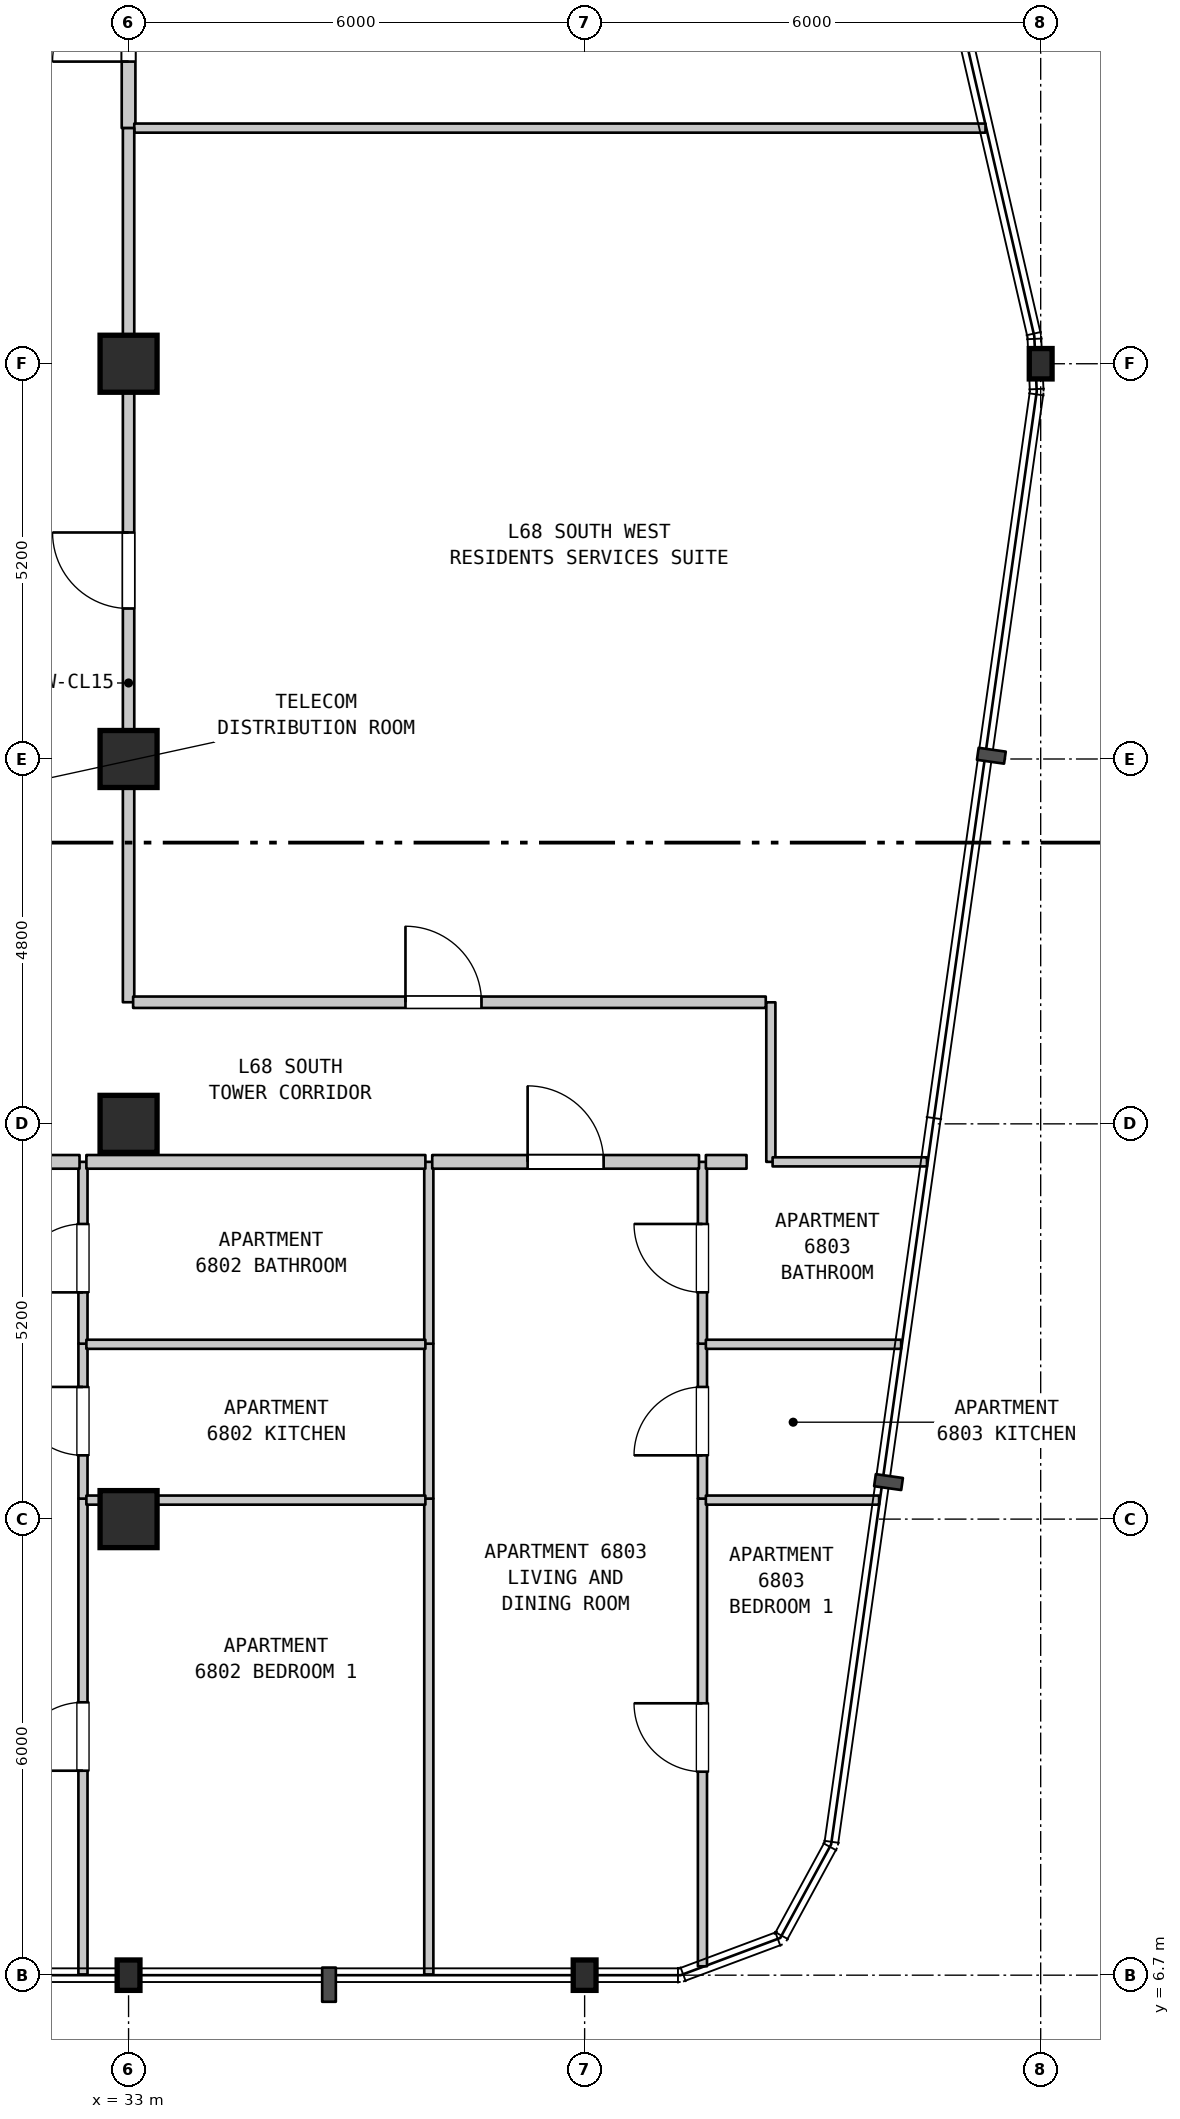
"""IFC4 building model, lengths in metres.
Left out: names, types, materials, properties, quantities, classifications, styles, units other than length and angle.
Written with IfcOpenShell. Run it as: python <this file> out.ifc"""

import sys

from ifc_helpers import new_model, si_unit, direction, frame, frame_2d, origin, origin_2d, place, context, subcontext, project, spatial, rectangle, i_section, extrude, element, fill, save


model = new_model("IFC4")
c1 = context("Model", 3, precision=1e-05, world=origin(), true_north=direction((0.0, 1.0)))
c2 = subcontext(c1, "Body", "Model", "MODEL_VIEW")
j1 = project(units=[si_unit("LENGTHUNIT", "METRE"), si_unit("PLANEANGLEUNIT", "RADIAN")], contexts=[c1])
p1 = place(None, origin())
s1 = spatial("IfcSite", under=j1, at=p1, CompositionType="ELEMENT")
p2 = place(p1, origin())
s2 = spatial("IfcBuilding", under=s1, at=p2, CompositionType="ELEMENT")
p3 = place(p2, frame((0.0, 0.0, 273.2)))
s3 = spatial("IfcBuildingStorey", under=s2, at=p3, CompositionType="ELEMENT", Elevation=273.2)
p4 = place(p3, frame((33.0, 6.7, 0.0), z_axis=(0.0, 0.0, 1.0), x_axis=(1.0, 0.0, 0.0)))
e1 = element("IfcColumn", 1, at=p4, inside=s3, PredefinedType="COLUMN", context=c2, shape_type="SweptSolid", body=[
    extrude(i_section(OverallWidth=0.3, OverallDepth=0.4, WebThickness=0.013, FlangeThickness=0.024, FilletRadius=0.027, at=origin_2d()), origin(), (0.0, 0.0, 1.0), 3.7),
])
for number, where, z_axis, x_axis in (
    (2, (33.0, 12.7, 0.0), (0.0, 0.0, 1.0), (1.0, 0.0, 0.0)),
    (3, (33.0, 17.9, 0.0), (0.0, 0.0, 1.0), (1.0, 0.0, 0.0)),
    (4, (33.0, 22.7, 0.0), (0.0, 0.0, 1.0), (1.0, 0.0, 0.0)),
    (5, (33.0, 27.9, 0.0), (0.0, 0.0, 1.0), (1.0, 0.0, 0.0)),
):
    element("IfcColumn", number, at=place(p3, frame(where, z_axis=z_axis, x_axis=x_axis)), inside=s3, PredefinedType="COLUMN", context=c2, shape_type="SweptSolid", body=[
        extrude(rectangle(XDim=0.75, YDim=0.75, at=origin_2d()), origin(), (0.0, 0.0, 1.0), 3.7),
    ])
for number, where, z_axis, x_axis in (
    (6, (39.0, 6.7, 0.0), (0.0, 0.0, 1.0), (1.0, 0.0, 0.0)),
    (7, (45.0, 27.9, 0.0), (0.0, 0.0, 1.0), (1.0, 0.0, 0.0)),
):
    element("IfcColumn", number, at=place(p3, frame(where, z_axis=z_axis, x_axis=x_axis)), inside=s3, PredefinedType="COLUMN", context=c2, shape_type="SweptSolid", body=[
        extrude(i_section(OverallWidth=0.3, OverallDepth=0.4, WebThickness=0.013, FlangeThickness=0.024, FilletRadius=0.027, at=origin_2d()), origin(), (0.0, 0.0, 1.0), 3.7),
    ])
p5 = place(p3, frame((32.4, 6.71, 0.0), z_axis=(0.0, 0.0, 1.0), x_axis=(0.0, 1.0, 0.0)))
e8 = element("IfcWall", 8, at=p5, inside=s3, PredefinedType="PARTITIONING", context=c2, shape_type="SweptSolid", body=[
    extrude(rectangle(XDim=6.26, YDim=0.12, at=frame_2d((3.13, 0.0))), origin(), (0.0, 0.0, 1.0), 3.39),
])
p6 = place(p5, frame((2.68, 0.0, 0.0)))
e9 = element("IfcOpeningElement", 9, at=p6, cuts=e8, PredefinedType="OPENING", context=c2, shape_type="SweptSolid", body=[
    extrude(rectangle(XDim=0.9, YDim=2.15, at=frame_2d((0.45, 1.075))), frame((0.0, 0.07, 0.0), z_axis=(0.0, -1.0, 0.0), x_axis=(1.0, 0.0, 0.0)), (0.0, 0.0, 1.0), 0.14),
])
p7 = place(p3, frame((32.4, 12.97, 0.0), z_axis=(0.0, 0.0, 1.0), x_axis=(0.0, 1.0, 0.0)))
e10 = element("IfcWall", 10, at=p7, inside=s3, PredefinedType="PARTITIONING", context=c2, shape_type="SweptSolid", body=[
    extrude(rectangle(XDim=2.038, YDim=0.12, at=frame_2d((1.019, 0.0))), origin(), (0.0, 0.0, 1.0), 3.39),
])
p8 = place(p7, frame((0.569, 0.0, 0.0)))
e11 = element("IfcOpeningElement", 11, at=p8, cuts=e10, PredefinedType="OPENING", context=c2, shape_type="SweptSolid", body=[
    extrude(rectangle(XDim=0.9, YDim=2.15, at=frame_2d((0.45, 1.075))), frame((0.0, 0.07, 0.0), z_axis=(0.0, -1.0, 0.0), x_axis=(1.0, 0.0, 0.0)), (0.0, 0.0, 1.0), 0.14),
])
p9 = place(p3, frame((32.4, 15.008, 0.0), z_axis=(0.0, 0.0, 1.0), x_axis=(0.0, 1.0, 0.0)))
e12 = element("IfcWall", 12, at=p9, inside=s3, PredefinedType="PARTITIONING", context=c2, shape_type="SweptSolid", body=[
    extrude(rectangle(XDim=2.392, YDim=0.12, at=frame_2d((1.196, 0.0))), origin(), (0.0, 0.0, 1.0), 3.39),
])
p10 = place(p9, frame((0.675, 0.0, 0.0)))
e13 = element("IfcOpeningElement", 13, at=p10, cuts=e12, PredefinedType="OPENING", context=c2, shape_type="SweptSolid", body=[
    extrude(rectangle(XDim=0.9, YDim=2.1, at=frame_2d((0.45, 1.05))), frame((0.0, 0.07, 0.0), z_axis=(0.0, -1.0, 0.0), x_axis=(1.0, 0.0, 0.0)), (0.0, 0.0, 1.0), 0.14),
])
p11 = place(p3, frame((33.0, 19.5, 0.0), z_axis=(0.0, 0.0, 1.0), x_axis=(0.0, 1.0, 0.0)))
e14 = element("IfcWall", 14, at=p11, inside=s3, PredefinedType="STANDARD", context=c2, shape_type="SweptSolid", body=[
    extrude(rectangle(XDim=8.4, YDim=0.15, at=frame_2d((4.2, 0.0))), origin(), (0.0, 0.0, 1.0), 3.1),
])
p12 = place(p11, frame((5.18, 0.0, 0.0)))
e15 = element("IfcOpeningElement", 15, at=p12, cuts=e14, PredefinedType="OPENING", context=c2, shape_type="SweptSolid", body=[
    extrude(rectangle(XDim=1.0, YDim=2.15, at=frame_2d((0.5, 1.075))), frame((0.0, 0.085, 0.0), z_axis=(0.0, -1.0, 0.0), x_axis=(1.0, 0.0, 0.0)), (0.0, 0.0, 1.0), 0.17),
])
p13 = place(p3, frame((33.0, 31.0, 0.0), z_axis=(0.0, 0.0, 1.0), x_axis=(0.0, 1.0, 0.0)))
e16 = element("IfcWall", 16, at=p13, inside=s3, PredefinedType="STANDARD", context=c2, shape_type="SweptSolid", body=[
    extrude(rectangle(XDim=2.75, YDim=0.18, at=frame_2d((1.375, 0.0))), origin(), (0.0, 0.0, 1.0), 2.89),
])
p14 = place(p13, frame((0.875, 0.0, 0.0)))
e17 = element("IfcOpeningElement", 17, at=p14, cuts=e16, PredefinedType="OPENING", context=c2, shape_type="SweptSolid", body=[
    extrude(rectangle(XDim=1.0, YDim=2.15, at=frame_2d((0.5, 1.075))), frame((0.0, 0.1, 0.0), z_axis=(0.0, -1.0, 0.0), x_axis=(1.0, 0.0, 0.0)), (0.0, 0.0, 1.0), 0.2),
])
p15 = place(p3, frame((36.95, 6.71, 0.0), z_axis=(0.0, 0.0, 1.0), x_axis=(0.0, 1.0, 0.0)))
e18 = element("IfcWall", 18, at=p15, inside=s3, PredefinedType="PARTITIONING", context=c2, shape_type="SweptSolid", body=[
    extrude(rectangle(XDim=6.26, YDim=0.12, at=frame_2d((3.13, 0.0))), origin(), (0.0, 0.0, 1.0), 3.39),
])
p16 = place(p3, frame((36.95, 12.97, 0.0), z_axis=(0.0, 0.0, 1.0), x_axis=(0.0, 1.0, 0.0)))
e19 = element("IfcWall", 19, at=p16, inside=s3, PredefinedType="PARTITIONING", context=c2, shape_type="SweptSolid", body=[
    extrude(rectangle(XDim=2.038, YDim=0.12, at=frame_2d((1.019, 0.0))), origin(), (0.0, 0.0, 1.0), 3.39),
])
p17 = place(p3, frame((36.95, 15.008, 0.0), z_axis=(0.0, 0.0, 1.0), x_axis=(0.0, 1.0, 0.0)))
e20 = element("IfcWall", 20, at=p17, inside=s3, PredefinedType="PARTITIONING", context=c2, shape_type="SweptSolid", body=[
    extrude(rectangle(XDim=2.392, YDim=0.12, at=frame_2d((1.196, 0.0))), origin(), (0.0, 0.0, 1.0), 3.39),
])
p18 = place(p3, frame((40.55, 6.817, 0.0), z_axis=(0.0, 0.0, 1.0), x_axis=(0.0, 1.0, 0.0)))
e21 = element("IfcWall", 21, at=p18, inside=s3, PredefinedType="PARTITIONING", context=c2, shape_type="SweptSolid", body=[
    extrude(rectangle(XDim=6.153, YDim=0.12, at=frame_2d((3.077, 0.0))), origin(), (0.0, 0.0, 1.0), 3.39),
])
p19 = place(p18, frame((2.56, 0.0, 0.0)))
e22 = element("IfcOpeningElement", 22, at=p19, cuts=e21, PredefinedType="OPENING", context=c2, shape_type="SweptSolid", body=[
    extrude(rectangle(XDim=0.9, YDim=2.15, at=frame_2d((0.45, 1.075))), frame((0.0, 0.07, 0.0), z_axis=(0.0, -1.0, 0.0), x_axis=(1.0, 0.0, 0.0)), (0.0, 0.0, 1.0), 0.14),
])
p20 = place(p3, frame((40.55, 12.97, 0.0), z_axis=(0.0, 0.0, 1.0), x_axis=(0.0, 1.0, 0.0)))
e23 = element("IfcWall", 23, at=p20, inside=s3, PredefinedType="PARTITIONING", context=c2, shape_type="SweptSolid", body=[
    extrude(rectangle(XDim=2.038, YDim=0.12, at=frame_2d((1.019, 0.0))), origin(), (0.0, 0.0, 1.0), 3.39),
])
p21 = place(p20, frame((0.569, 0.0, 0.0)))
e24 = element("IfcOpeningElement", 24, at=p21, cuts=e23, PredefinedType="OPENING", context=c2, shape_type="SweptSolid", body=[
    extrude(rectangle(XDim=0.9, YDim=2.15, at=frame_2d((0.45, 1.075))), frame((0.0, 0.07, 0.0), z_axis=(0.0, -1.0, 0.0), x_axis=(1.0, 0.0, 0.0)), (0.0, 0.0, 1.0), 0.14),
])
p22 = place(p3, frame((40.55, 15.008, 0.0), z_axis=(0.0, 0.0, 1.0), x_axis=(0.0, 1.0, 0.0)))
e25 = element("IfcWall", 25, at=p22, inside=s3, PredefinedType="PARTITIONING", context=c2, shape_type="SweptSolid", body=[
    extrude(rectangle(XDim=2.392, YDim=0.12, at=frame_2d((1.196, 0.0))), origin(), (0.0, 0.0, 1.0), 3.39),
])
p23 = place(p22, frame((0.675, 0.0, 0.0)))
e26 = element("IfcOpeningElement", 26, at=p23, cuts=e25, PredefinedType="OPENING", context=c2, shape_type="SweptSolid", body=[
    extrude(rectangle(XDim=0.9, YDim=2.1, at=frame_2d((0.45, 1.05))), frame((0.0, 0.07, 0.0), z_axis=(0.0, -1.0, 0.0), x_axis=(1.0, 0.0, 0.0)), (0.0, 0.0, 1.0), 0.14),
])
p24 = place(p3, frame((41.45, 17.4, 0.0), z_axis=(0.0, 0.0, 1.0), x_axis=(0.0, 1.0, 0.0)))
e27 = element("IfcWall", 27, at=p24, inside=s3, PredefinedType="PARTITIONING", context=c2, shape_type="SweptSolid", body=[
    extrude(rectangle(XDim=2.099, YDim=0.12, at=frame_2d((1.05, 0.0))), origin(), (0.0, 0.0, 1.0), 3.39),
])
p25 = place(p3, frame((32.445, 12.95, 0.0), z_axis=(0.0, 0.0, 1.0), x_axis=(1.0, 0.0, 0.0)))
e28 = element("IfcWall", 28, at=p25, inside=s3, PredefinedType="PARTITIONING", context=c2, shape_type="SweptSolid", body=[
    extrude(rectangle(XDim=4.46, YDim=0.12, at=frame_2d((2.23, 0.0))), origin(), (0.0, 0.0, 1.0), 3.39),
])
p26 = place(p3, frame((40.595, 12.95, 0.0), z_axis=(0.0, 0.0, 1.0), x_axis=(1.0, 0.0, 0.0)))
e29 = element("IfcWall", 29, at=p26, inside=s3, PredefinedType="PARTITIONING", context=c2, shape_type="SweptSolid", body=[
    extrude(rectangle(XDim=2.279, YDim=0.12, at=frame_2d((1.14, 0.0))), origin(), (0.0, 0.0, 1.0), 3.39),
])
p27 = place(p3, frame((32.445, 15.0, 0.0), z_axis=(0.0, 0.0, 1.0), x_axis=(1.0, 0.0, 0.0)))
e30 = element("IfcWall", 30, at=p27, inside=s3, PredefinedType="PARTITIONING", context=c2, shape_type="SweptSolid", body=[
    extrude(rectangle(XDim=4.46, YDim=0.12, at=frame_2d((2.23, 0.0))), origin(), (0.0, 0.0, 1.0), 3.39),
])
p28 = place(p3, frame((40.595, 15.0, 0.0), z_axis=(0.0, 0.0, 1.0), x_axis=(1.0, 0.0, 0.0)))
e31 = element("IfcWall", 31, at=p28, inside=s3, PredefinedType="PARTITIONING", context=c2, shape_type="SweptSolid", body=[
    extrude(rectangle(XDim=2.569, YDim=0.12, at=frame_2d((1.285, 0.0))), origin(), (0.0, 0.0, 1.0), 3.39),
])
p29 = place(p3, frame((28.845, 17.4, 0.0), z_axis=(0.0, 0.0, 1.0), x_axis=(1.0, 0.0, 0.0)))
e32 = element("IfcWall", 32, at=p29, inside=s3, PredefinedType="STANDARD", context=c2, shape_type="SweptSolid", body=[
    extrude(rectangle(XDim=3.51, YDim=0.18, at=frame_2d((1.755, 0.0))), origin(), (0.0, 0.0, 1.0), 3.39),
])
p30 = place(p29, frame((1.255, 0.0, 0.0)))
e33 = element("IfcOpeningElement", 33, at=p30, cuts=e32, PredefinedType="OPENING", context=c2, shape_type="SweptSolid", body=[
    extrude(rectangle(XDim=1.0, YDim=2.15, at=frame_2d((0.5, 1.075))), frame((0.0, 0.1, 0.0), z_axis=(0.0, -1.0, 0.0), x_axis=(1.0, 0.0, 0.0)), (0.0, 0.0, 1.0), 0.2),
])
p31 = place(p3, frame((32.445, 17.4, 0.0), z_axis=(0.0, 0.0, 1.0), x_axis=(1.0, 0.0, 0.0)))
e34 = element("IfcWall", 34, at=p31, inside=s3, PredefinedType="STANDARD", context=c2, shape_type="SweptSolid", body=[
    extrude(rectangle(XDim=4.46, YDim=0.18, at=frame_2d((2.23, 0.0))), origin(), (0.0, 0.0, 1.0), 3.39),
])
p32 = place(p3, frame((36.995, 17.4, 0.0), z_axis=(0.0, 0.0, 1.0), x_axis=(1.0, 0.0, 0.0)))
e35 = element("IfcWall", 35, at=p32, inside=s3, PredefinedType="STANDARD", context=c2, shape_type="SweptSolid", body=[
    extrude(rectangle(XDim=3.51, YDim=0.18, at=frame_2d((1.755, 0.0))), origin(), (0.0, 0.0, 1.0), 3.39),
])
p33 = place(p32, frame((1.255, 0.0, 0.0)))
e36 = element("IfcOpeningElement", 36, at=p33, cuts=e35, PredefinedType="OPENING", context=c2, shape_type="SweptSolid", body=[
    extrude(rectangle(XDim=1.0, YDim=2.15, at=frame_2d((0.5, 1.075))), frame((0.0, 0.1, 0.0), z_axis=(0.0, -1.0, 0.0), x_axis=(1.0, 0.0, 0.0)), (0.0, 0.0, 1.0), 0.2),
])
p34 = place(p3, frame((40.595, 17.4, 0.0), z_axis=(0.0, 0.0, 1.0), x_axis=(1.0, 0.0, 0.0)))
e37 = element("IfcWall", 37, at=p34, inside=s3, PredefinedType="STANDARD", context=c2, shape_type="SweptSolid", body=[
    extrude(rectangle(XDim=0.535, YDim=0.18, at=frame_2d((0.268, 0.0))), origin(), (0.0, 0.0, 1.0), 3.39),
])
p35 = place(p3, frame((41.473, 17.4, 0.0), z_axis=(0.0, 0.0, 1.0), x_axis=(1.0, 0.0, 0.0)))
e38 = element("IfcWall", 38, at=p35, inside=s3, PredefinedType="PARTITIONING", context=c2, shape_type="SweptSolid", body=[
    extrude(rectangle(XDim=2.031, YDim=0.12, at=frame_2d((1.016, 0.0))), origin(), (0.0, 0.0, 1.0), 3.39),
])
p36 = place(p3, frame((33.06, 19.5, 0.0), z_axis=(0.0, 0.0, 1.0), x_axis=(1.0, 0.0, 0.0)))
e39 = element("IfcWall", 39, at=p36, inside=s3, PredefinedType="STANDARD", context=c2, shape_type="SweptSolid", body=[
    extrude(rectangle(XDim=8.323, YDim=0.15, at=frame_2d((4.162, 0.0))), origin(), (0.0, 0.0, 1.0), 3.39),
])
p37 = place(p36, frame((3.583, 0.0, 0.0)))
e40 = element("IfcOpeningElement", 40, at=p37, cuts=e39, PredefinedType="OPENING", context=c2, shape_type="SweptSolid", body=[
    extrude(rectangle(XDim=1.0, YDim=2.15, at=frame_2d((0.5, 1.075))), frame((0.0, 0.085, 0.0), z_axis=(0.0, -1.0, 0.0), x_axis=(1.0, 0.0, 0.0)), (0.0, 0.0, 1.0), 0.17),
])
p38 = place(p3, frame((33.075, 31.0, 0.0), z_axis=(0.0, 0.0, 1.0), x_axis=(1.0, 0.0, 0.0)))
e41 = element("IfcWall", 41, at=p38, inside=s3, PredefinedType="PARTITIONING", context=c2, shape_type="SweptSolid", body=[
    extrude(rectangle(XDim=11.199, YDim=0.12, at=frame_2d((5.6, 0.0))), origin(), (0.0, 0.0, 1.0), 3.39),
])
p39 = place(p3, frame((33.0, 27.9, 0.0), z_axis=(0.0, 0.0, 1.0), x_axis=(0.0, 1.0, 0.0)))
e42 = element("IfcWall", 42, at=p39, inside=s3, PredefinedType="STANDARD", context=c2, shape_type="SweptSolid", body=[
    extrude(rectangle(XDim=3.1, YDim=0.15, at=frame_2d((1.55, 0.0))), origin(), (0.0, 0.0, 1.0), 2.89),
])
p40 = place(p6, origin())
e43 = element("IfcDoor", 43, at=p40, inside=s3, OperationType="SINGLE_SWING_LEFT", PredefinedType="DOOR", context=c2, shape_type="SweptSolid", body=[
    extrude(rectangle(XDim=0.9, YDim=2.15, at=frame_2d((0.45, 1.075))), frame((0.0, 0.025, 0.0), z_axis=(0.0, -1.0, 0.0), x_axis=(1.0, 0.0, 0.0)), (0.0, 0.0, 1.0), 0.05),
])
fill(e9, e43)
p41 = place(p8, origin())
e44 = element("IfcDoor", 44, at=p41, inside=s3, OperationType="SINGLE_SWING_RIGHT", PredefinedType="DOOR", context=c2, shape_type="SweptSolid", body=[
    extrude(rectangle(XDim=0.9, YDim=2.15, at=frame_2d((0.45, 1.075))), frame((0.0, 0.025, 0.0), z_axis=(0.0, -1.0, 0.0), x_axis=(1.0, 0.0, 0.0)), (0.0, 0.0, 1.0), 0.05),
])
fill(e11, e44)
p42 = place(p10, origin())
e45 = element("IfcDoor", 45, at=p42, inside=s3, OperationType="SINGLE_SWING_LEFT", PredefinedType="DOOR", context=c2, shape_type="SweptSolid", body=[
    extrude(rectangle(XDim=0.9, YDim=2.1, at=frame_2d((0.45, 1.05))), frame((0.0, 0.025, 0.0), z_axis=(0.0, -1.0, 0.0), x_axis=(1.0, 0.0, 0.0)), (0.0, 0.0, 1.0), 0.05),
])
fill(e13, e45)
p43 = place(p12, origin())
e46 = element("IfcDoor", 46, at=p43, inside=s3, OperationType="SINGLE_SWING_RIGHT", PredefinedType="DOOR", context=c2, shape_type="SweptSolid", body=[
    extrude(rectangle(XDim=1.0, YDim=2.15, at=frame_2d((0.5, 1.075))), frame((0.0, 0.025, 0.0), z_axis=(0.0, -1.0, 0.0), x_axis=(1.0, 0.0, 0.0)), (0.0, 0.0, 1.0), 0.05),
])
fill(e15, e46)
p44 = place(p14, origin())
e47 = element("IfcDoor", 47, at=p44, inside=s3, OperationType="SINGLE_SWING_LEFT", PredefinedType="DOOR", context=c2, shape_type="SweptSolid", body=[
    extrude(rectangle(XDim=1.0, YDim=2.15, at=frame_2d((0.5, 1.075))), frame((0.0, 0.025, 0.0), z_axis=(0.0, -1.0, 0.0), x_axis=(1.0, 0.0, 0.0)), (0.0, 0.0, 1.0), 0.05),
])
fill(e17, e47)
p45 = place(p19, origin())
e48 = element("IfcDoor", 48, at=p45, inside=s3, OperationType="SINGLE_SWING_RIGHT", PredefinedType="DOOR", context=c2, shape_type="SweptSolid", body=[
    extrude(rectangle(XDim=0.9, YDim=2.15, at=frame_2d((0.45, 1.075))), frame((0.0, 0.025, 0.0), z_axis=(0.0, -1.0, 0.0), x_axis=(1.0, 0.0, 0.0)), (0.0, 0.0, 1.0), 0.05),
])
fill(e22, e48)
p46 = place(p21, origin())
e49 = element("IfcDoor", 49, at=p46, inside=s3, OperationType="SINGLE_SWING_LEFT", PredefinedType="DOOR", context=c2, shape_type="SweptSolid", body=[
    extrude(rectangle(XDim=0.9, YDim=2.15, at=frame_2d((0.45, 1.075))), frame((0.0, 0.025, 0.0), z_axis=(0.0, -1.0, 0.0), x_axis=(1.0, 0.0, 0.0)), (0.0, 0.0, 1.0), 0.05),
])
fill(e24, e49)
p47 = place(p23, origin())
e50 = element("IfcDoor", 50, at=p47, inside=s3, OperationType="SINGLE_SWING_RIGHT", PredefinedType="DOOR", context=c2, shape_type="SweptSolid", body=[
    extrude(rectangle(XDim=0.9, YDim=2.1, at=frame_2d((0.45, 1.05))), frame((0.0, 0.025, 0.0), z_axis=(0.0, -1.0, 0.0), x_axis=(1.0, 0.0, 0.0)), (0.0, 0.0, 1.0), 0.05),
])
fill(e26, e50)
p48 = place(p33, origin())
e51 = element("IfcDoor", 51, at=p48, inside=s3, OperationType="SINGLE_SWING_LEFT", PredefinedType="DOOR", context=c2, shape_type="SweptSolid", body=[
    extrude(rectangle(XDim=1.0, YDim=2.15, at=frame_2d((0.5, 1.075))), frame((0.0, 0.025, 0.0), z_axis=(0.0, -1.0, 0.0), x_axis=(1.0, 0.0, 0.0)), (0.0, 0.0, 1.0), 0.05),
])
fill(e36, e51)
p49 = place(p37, origin())
e52 = element("IfcDoor", 52, at=p49, inside=s3, OperationType="SINGLE_SWING_LEFT", PredefinedType="DOOR", context=c2, shape_type="SweptSolid", body=[
    extrude(rectangle(XDim=1.0, YDim=2.15, at=frame_2d((0.5, 1.075))), frame((0.0, 0.025, 0.0), z_axis=(0.0, -1.0, 0.0), x_axis=(1.0, 0.0, 0.0)), (0.0, 0.0, 1.0), 0.05),
])
fill(e40, e52)
save(model, sys.argv[1])
